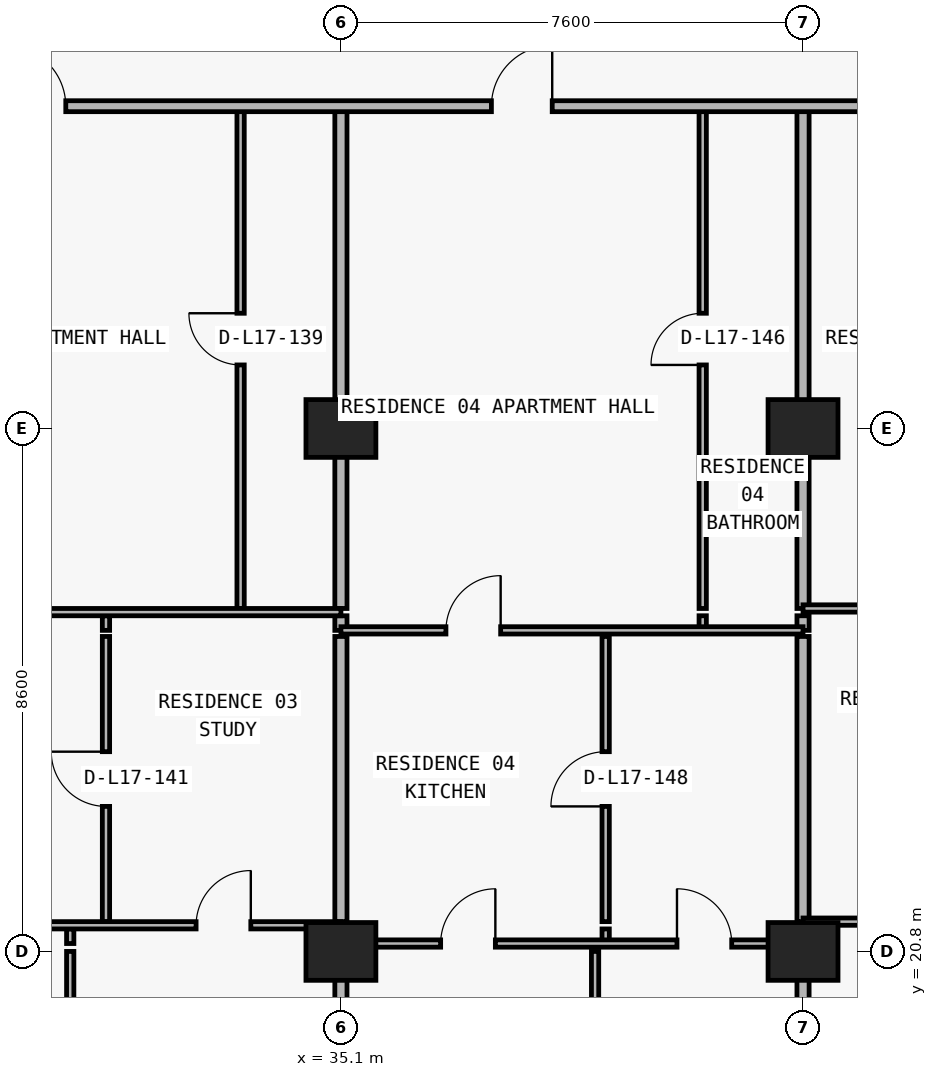
"""IFC4 building model, lengths in metres.
Left out: names, types, materials, properties, quantities, classifications, styles, units other than length and angle.
Written with IfcOpenShell. Run it as: python <this file> out.ifc"""

import sys

from ifc_helpers import new_model, si_unit, direction, frame, frame_2d, origin, origin_2d, place, context, subcontext, project, spatial, rectangle, extrude, element, fill, save


model = new_model("IFC4")
c1 = context("Model", 3, precision=1e-05, world=origin(), true_north=direction((0.0, 1.0)))
c2 = subcontext(c1, "Body", "Model", "MODEL_VIEW")
j1 = project(units=[si_unit("LENGTHUNIT", "METRE"), si_unit("PLANEANGLEUNIT", "RADIAN")], contexts=[c1])
p1 = place(None, origin())
s1 = spatial("IfcSite", under=j1, at=p1, CompositionType="ELEMENT")
p2 = place(p1, origin())
s2 = spatial("IfcBuilding", under=s1, at=p2, CompositionType="ELEMENT")
p3 = place(p2, frame((0.0, 0.0, 66.3)))
s3 = spatial("IfcBuildingStorey", under=s2, at=p3, CompositionType="ELEMENT", Elevation=66.3)
for number, where, z_axis, x_axis in (
    (1, (35.1, 20.8, 0.0), (0.0, 0.0, 1.0), (1.0, 0.0, 0.0)),
    (2, (42.7, 20.8, 0.0), (0.0, 0.0, 1.0), (1.0, 0.0, 0.0)),
    (3, (35.1, 29.4, 0.0), (0.0, 0.0, 1.0), (1.0, 0.0, 0.0)),
    (4, (42.7, 29.4, 0.0), (0.0, 0.0, 1.0), (1.0, 0.0, 0.0)),
):
    element("IfcColumn", number, at=place(p3, frame(where, z_axis=z_axis, x_axis=x_axis)), inside=s3, PredefinedType="COLUMN", context=c2, shape_type="SweptSolid", body=[
        extrude(rectangle(XDim=1.15, YDim=0.95, at=origin_2d()), origin(), (0.0, 0.0, 1.0), 3.05),
    ])
p4 = place(p3, frame((30.648, 6.24, 0.0), z_axis=(0.0, 0.0, 1.0), x_axis=(0.0, 1.0, 0.0)))
e5 = element("IfcWall", 5, at=p4, inside=s3, PredefinedType="PARTITIONING", context=c2, shape_type="SweptSolid", body=[
    extrude(rectangle(XDim=14.56, YDim=0.12, at=frame_2d((7.28, 0.0))), origin(), (0.0, 0.0, 1.0), 2.423),
])
p5 = place(p3, frame((30.648, 20.93, 0.0), z_axis=(0.0, 0.0, 1.0), x_axis=(0.0, 1.0, 0.0)))
e6 = element("IfcWall", 6, at=p5, inside=s3, PredefinedType="PARTITIONING", context=c2, shape_type="SweptSolid", body=[
    extrude(rectangle(XDim=0.24, YDim=0.12, at=frame_2d((0.12, 0.0))), origin(), (0.0, 0.0, 1.0), 2.423),
])
p6 = place(p3, frame((31.236, 21.29, 0.0), z_axis=(0.0, 0.0, 1.0), x_axis=(0.0, 1.0, 0.0)))
e7 = element("IfcWall", 7, at=p6, inside=s3, PredefinedType="PARTITIONING", context=c2, shape_type="SweptSolid", body=[
    extrude(rectangle(XDim=4.69, YDim=0.12, at=frame_2d((2.345, 0.0))), origin(), (0.0, 0.0, 1.0), 3.05),
])
p7 = place(p6, frame((1.895, 0.0, 0.0)))
e8 = element("IfcOpeningElement", 8, at=p7, cuts=e7, PredefinedType="OPENING", context=c2, shape_type="SweptSolid", body=[
    extrude(rectangle(XDim=0.9, YDim=2.15, at=frame_2d((0.45, 1.075))), frame((0.0, 0.07, 0.0), z_axis=(0.0, -1.0, 0.0), x_axis=(1.0, 0.0, 0.0)), (0.0, 0.0, 1.0), 0.14),
])
p8 = place(p3, frame((31.236, 26.08, 0.0), z_axis=(0.0, 0.0, 1.0), x_axis=(0.0, 1.0, 0.0)))
e9 = element("IfcWall", 9, at=p8, inside=s3, PredefinedType="PARTITIONING", context=c2, shape_type="SweptSolid", body=[
    extrude(rectangle(XDim=0.24, YDim=0.12, at=frame_2d((0.12, 0.0))), origin(), (0.0, 0.0, 1.0), 3.05),
])
p9 = place(p3, frame((33.45, 26.44, 0.0), z_axis=(0.0, 0.0, 1.0), x_axis=(0.0, 1.0, 0.0)))
e10 = element("IfcWall", 10, at=p9, inside=s3, PredefinedType="PARTITIONING", context=c2, shape_type="SweptSolid", body=[
    extrude(rectangle(XDim=8.26, YDim=0.12, at=frame_2d((4.13, 0.0))), origin(), (0.0, 0.0, 1.0), 3.05),
])
p10 = place(p9, frame((4.005, 0.0, 0.0)))
e11 = element("IfcOpeningElement", 11, at=p10, cuts=e10, PredefinedType="OPENING", context=c2, shape_type="SweptSolid", body=[
    extrude(rectangle(XDim=0.85, YDim=2.1, at=frame_2d((0.425, 1.05))), frame((0.0, 0.07, 0.0), z_axis=(0.0, -1.0, 0.0), x_axis=(1.0, 0.0, 0.0)), (0.0, 0.0, 1.0), 0.14),
])
p11 = place(p3, frame((35.1, 6.24, 0.0), z_axis=(0.0, 0.0, 1.0), x_axis=(0.0, 1.0, 0.0)))
e12 = element("IfcWall", 12, at=p11, inside=s3, PredefinedType="PARTITIONING", context=c2, shape_type="SweptSolid", body=[
    extrude(rectangle(XDim=14.56, YDim=0.2, at=frame_2d((7.28, 0.0))), origin(), (0.0, 0.0, 1.0), 2.11),
])
p12 = place(p3, frame((35.1, 20.93, 0.0), z_axis=(0.0, 0.0, 1.0), x_axis=(0.0, 1.0, 0.0)))
e13 = element("IfcWall", 13, at=p12, inside=s3, PredefinedType="PARTITIONING", context=c2, shape_type="SweptSolid", body=[
    extrude(rectangle(XDim=0.24, YDim=0.2, at=frame_2d((0.12, 0.0))), origin(), (0.0, 0.0, 1.0), 3.05),
])
p13 = place(p3, frame((35.1, 21.29, 0.0), z_axis=(0.0, 0.0, 1.0), x_axis=(0.0, 1.0, 0.0)))
e14 = element("IfcWall", 14, at=p13, inside=s3, PredefinedType="PARTITIONING", context=c2, shape_type="SweptSolid", body=[
    extrude(rectangle(XDim=4.69, YDim=0.2, at=frame_2d((2.345, 0.0))), origin(), (0.0, 0.0, 1.0), 2.11),
])
p14 = place(p3, frame((35.1, 26.08, 0.0), z_axis=(0.0, 0.0, 1.0), x_axis=(0.0, 1.0, 0.0)))
e15 = element("IfcWall", 15, at=p14, inside=s3, PredefinedType="PARTITIONING", context=c2, shape_type="SweptSolid", body=[
    extrude(rectangle(XDim=0.24, YDim=0.2, at=frame_2d((0.12, 0.0))), origin(), (0.0, 0.0, 1.0), 2.11),
])
p15 = place(p3, frame((35.1, 26.44, 0.0), z_axis=(0.0, 0.0, 1.0), x_axis=(0.0, 1.0, 0.0)))
e16 = element("IfcWall", 16, at=p15, inside=s3, PredefinedType="PARTITIONING", context=c2, shape_type="SweptSolid", body=[
    extrude(rectangle(XDim=8.26, YDim=0.2, at=frame_2d((4.13, 0.0))), origin(), (0.0, 0.0, 1.0), 2.11),
])
p16 = place(p3, frame((39.28, 6.24, 0.0), z_axis=(0.0, 0.0, 1.0), x_axis=(0.0, 1.0, 0.0)))
e17 = element("IfcWall", 17, at=p16, inside=s3, PredefinedType="PARTITIONING", context=c2, shape_type="SweptSolid", body=[
    extrude(rectangle(XDim=14.56, YDim=0.12, at=frame_2d((7.28, 0.0))), origin(), (0.0, 0.0, 1.0), 3.05),
])
p17 = place(p3, frame((39.454, 20.93, 0.0), z_axis=(0.0, 0.0, 1.0), x_axis=(0.0, 1.0, 0.0)))
e18 = element("IfcWall", 18, at=p17, inside=s3, PredefinedType="PARTITIONING", context=c2, shape_type="SweptSolid", body=[
    extrude(rectangle(XDim=0.24, YDim=0.12, at=frame_2d((0.12, 0.0))), origin(), (0.0, 0.0, 1.0), 3.05),
])
p18 = place(p3, frame((39.454, 21.29, 0.0), z_axis=(0.0, 0.0, 1.0), x_axis=(0.0, 1.0, 0.0)))
e19 = element("IfcWall", 19, at=p18, inside=s3, PredefinedType="PARTITIONING", context=c2, shape_type="SweptSolid", body=[
    extrude(rectangle(XDim=4.69, YDim=0.12, at=frame_2d((2.345, 0.0))), origin(), (0.0, 0.0, 1.0), 3.05),
])
p19 = place(p18, frame((1.895, 0.0, 0.0)))
e20 = element("IfcOpeningElement", 20, at=p19, cuts=e19, PredefinedType="OPENING", context=c2, shape_type="SweptSolid", body=[
    extrude(rectangle(XDim=0.9, YDim=2.15, at=frame_2d((0.45, 1.075))), frame((0.0, 0.07, 0.0), z_axis=(0.0, -1.0, 0.0), x_axis=(1.0, 0.0, 0.0)), (0.0, 0.0, 1.0), 0.14),
])
p20 = place(p3, frame((41.05, 26.08, 0.0), z_axis=(0.0, 0.0, 1.0), x_axis=(0.0, 1.0, 0.0)))
e21 = element("IfcWall", 21, at=p20, inside=s3, PredefinedType="PARTITIONING", context=c2, shape_type="SweptSolid", body=[
    extrude(rectangle(XDim=0.24, YDim=0.12, at=frame_2d((0.12, 0.0))), origin(), (0.0, 0.0, 1.0), 2.578),
])
p21 = place(p3, frame((41.05, 26.44, 0.0), z_axis=(0.0, 0.0, 1.0), x_axis=(0.0, 1.0, 0.0)))
e22 = element("IfcWall", 22, at=p21, inside=s3, PredefinedType="PARTITIONING", context=c2, shape_type="SweptSolid", body=[
    extrude(rectangle(XDim=8.26, YDim=0.12, at=frame_2d((4.13, 0.0))), origin(), (0.0, 0.0, 1.0), 2.578),
])
p22 = place(p21, frame((4.005, 0.0, 0.0)))
e23 = element("IfcOpeningElement", 23, at=p22, cuts=e22, PredefinedType="OPENING", context=c2, shape_type="SweptSolid", body=[
    extrude(rectangle(XDim=0.85, YDim=2.1, at=frame_2d((0.425, 1.05))), frame((0.0, 0.07, 0.0), z_axis=(0.0, -1.0, 0.0), x_axis=(1.0, 0.0, 0.0)), (0.0, 0.0, 1.0), 0.14),
])
p23 = place(p3, frame((42.7, 6.24, 0.0), z_axis=(0.0, 0.0, 1.0), x_axis=(0.0, 1.0, 0.0)))
e24 = element("IfcWall", 24, at=p23, inside=s3, PredefinedType="PARTITIONING", context=c2, shape_type="SweptSolid", body=[
    extrude(rectangle(XDim=14.56, YDim=0.2, at=frame_2d((7.28, 0.0))), origin(), (0.0, 0.0, 1.0), 2.11),
])
p24 = place(p3, frame((42.7, 20.93, 0.0), z_axis=(0.0, 0.0, 1.0), x_axis=(0.0, 1.0, 0.0)))
e25 = element("IfcWall", 25, at=p24, inside=s3, PredefinedType="PARTITIONING", context=c2, shape_type="SweptSolid", body=[
    extrude(rectangle(XDim=0.24, YDim=0.2, at=frame_2d((0.12, 0.0))), origin(), (0.0, 0.0, 1.0), 3.05),
])
p25 = place(p3, frame((42.7, 21.29, 0.0), z_axis=(0.0, 0.0, 1.0), x_axis=(0.0, 1.0, 0.0)))
e26 = element("IfcWall", 26, at=p25, inside=s3, PredefinedType="PARTITIONING", context=c2, shape_type="SweptSolid", body=[
    extrude(rectangle(XDim=4.69, YDim=0.2, at=frame_2d((2.345, 0.0))), origin(), (0.0, 0.0, 1.0), 2.11),
])
p26 = place(p3, frame((42.7, 26.08, 0.0), z_axis=(0.0, 0.0, 1.0), x_axis=(0.0, 1.0, 0.0)))
e27 = element("IfcWall", 27, at=p26, inside=s3, PredefinedType="PARTITIONING", context=c2, shape_type="SweptSolid", body=[
    extrude(rectangle(XDim=0.24, YDim=0.2, at=frame_2d((0.12, 0.0))), origin(), (0.0, 0.0, 1.0), 2.11),
])
p27 = place(p3, frame((42.7, 26.44, 0.0), z_axis=(0.0, 0.0, 1.0), x_axis=(0.0, 1.0, 0.0)))
e28 = element("IfcWall", 28, at=p27, inside=s3, PredefinedType="PARTITIONING", context=c2, shape_type="SweptSolid", body=[
    extrude(rectangle(XDim=8.26, YDim=0.2, at=frame_2d((4.13, 0.0))), origin(), (0.0, 0.0, 1.0), 2.11),
])
p28 = place(p3, frame((35.1, 20.93, 0.0), z_axis=(0.0, 0.0, 1.0), x_axis=(1.0, 0.0, 0.0)))
e29 = element("IfcWall", 29, at=p28, inside=s3, PredefinedType="PARTITIONING", context=c2, shape_type="SweptSolid", body=[
    extrude(rectangle(XDim=7.6, YDim=0.12, at=frame_2d((3.8, 0.0))), origin(), (0.0, 0.0, 1.0), 2.11),
])
p29 = place(p28, frame((1.64, 0.0, 0.0)))
e30 = element("IfcOpeningElement", 30, at=p29, cuts=e29, PredefinedType="OPENING", context=c2, shape_type="SweptSolid", body=[
    extrude(rectangle(XDim=0.9, YDim=2.06, at=frame_2d((0.45, 1.03))), frame((0.0, 0.07, 0.0), z_axis=(0.0, -1.0, 0.0), x_axis=(1.0, 0.0, 0.0)), (0.0, 0.0, 1.0), 0.14),
])
p30 = place(p28, frame((5.527, 0.0, 0.0)))
e31 = element("IfcOpeningElement", 31, at=p30, cuts=e29, PredefinedType="OPENING", context=c2, shape_type="SweptSolid", body=[
    extrude(rectangle(XDim=0.9, YDim=2.06, at=frame_2d((0.45, 1.03))), frame((0.0, 0.07, 0.0), z_axis=(0.0, -1.0, 0.0), x_axis=(1.0, 0.0, 0.0)), (0.0, 0.0, 1.0), 0.14),
])
p31 = place(p3, frame((26.97, 21.23, 0.0), z_axis=(0.0, 0.0, 1.0), x_axis=(1.0, 0.0, 0.0)))
e32 = element("IfcWall", 32, at=p31, inside=s3, PredefinedType="PARTITIONING", context=c2, shape_type="SweptSolid", body=[
    extrude(rectangle(XDim=8.13, YDim=0.12, at=frame_2d((4.065, 0.0))), origin(), (0.0, 0.0, 1.0), 3.05),
])
p32 = place(p31, frame((1.389, 0.0, 0.0)))
e33 = element("IfcOpeningElement", 33, at=p32, cuts=e32, PredefinedType="OPENING", context=c2, shape_type="SweptSolid", body=[
    extrude(rectangle(XDim=0.9, YDim=2.15, at=frame_2d((0.45, 1.075))), frame((0.0, 0.07, 0.0), z_axis=(0.0, -1.0, 0.0), x_axis=(1.0, 0.0, 0.0)), (0.0, 0.0, 1.0), 0.14),
])
p33 = place(p31, frame((5.748, 0.0, 0.0)))
e34 = element("IfcOpeningElement", 34, at=p33, cuts=e32, PredefinedType="OPENING", context=c2, shape_type="SweptSolid", body=[
    extrude(rectangle(XDim=0.9, YDim=2.15, at=frame_2d((0.45, 1.075))), frame((0.0, 0.07, 0.0), z_axis=(0.0, -1.0, 0.0), x_axis=(1.0, 0.0, 0.0)), (0.0, 0.0, 1.0), 0.14),
])
p34 = place(p3, frame((42.7, 21.29, 0.0), z_axis=(0.0, 0.0, 1.0), x_axis=(1.0, 0.0, 0.0)))
e35 = element("IfcWall", 35, at=p34, inside=s3, PredefinedType="PARTITIONING", context=c2, shape_type="SweptSolid", body=[
    extrude(rectangle(XDim=8.13, YDim=0.12, at=frame_2d((4.065, 0.0))), origin(), (0.0, 0.0, 1.0), 3.05),
])
p35 = place(p34, frame((1.524, 0.0, 0.0)))
e36 = element("IfcOpeningElement", 36, at=p35, cuts=e35, PredefinedType="OPENING", context=c2, shape_type="SweptSolid", body=[
    extrude(rectangle(XDim=0.9, YDim=2.15, at=frame_2d((0.45, 1.075))), frame((0.0, 0.07, 0.0), z_axis=(0.0, -1.0, 0.0), x_axis=(1.0, 0.0, 0.0)), (0.0, 0.0, 1.0), 0.14),
])
p36 = place(p34, frame((5.758, 0.0, 0.0)))
e37 = element("IfcOpeningElement", 37, at=p36, cuts=e35, PredefinedType="OPENING", context=c2, shape_type="SweptSolid", body=[
    extrude(rectangle(XDim=0.9, YDim=2.15, at=frame_2d((0.45, 1.075))), frame((0.0, 0.07, 0.0), z_axis=(0.0, -1.0, 0.0), x_axis=(1.0, 0.0, 0.0)), (0.0, 0.0, 1.0), 0.14),
])
p37 = place(p3, frame((35.1, 26.08, 0.0), z_axis=(0.0, 0.0, 1.0), x_axis=(1.0, 0.0, 0.0)))
e38 = element("IfcWall", 38, at=p37, inside=s3, PredefinedType="PARTITIONING", context=c2, shape_type="SweptSolid", body=[
    extrude(rectangle(XDim=7.6, YDim=0.12, at=frame_2d((3.8, 0.0))), origin(), (0.0, 0.0, 1.0), 3.05),
])
p38 = place(p37, frame((1.727, 0.0, 0.0)))
e39 = element("IfcOpeningElement", 39, at=p38, cuts=e38, PredefinedType="OPENING", context=c2, shape_type="SweptSolid", body=[
    extrude(rectangle(XDim=0.9, YDim=2.15, at=frame_2d((0.45, 1.075))), frame((0.0, 0.07, 0.0), z_axis=(0.0, -1.0, 0.0), x_axis=(1.0, 0.0, 0.0)), (0.0, 0.0, 1.0), 0.14),
])
p39 = place(p3, frame((26.97, 26.38, 0.0), z_axis=(0.0, 0.0, 1.0), x_axis=(1.0, 0.0, 0.0)))
e40 = element("IfcWall", 40, at=p39, inside=s3, PredefinedType="PARTITIONING", context=c2, shape_type="SweptSolid", body=[
    extrude(rectangle(XDim=8.13, YDim=0.12, at=frame_2d((4.065, 0.0))), origin(), (0.0, 0.0, 1.0), 3.05),
])
p40 = place(p39, frame((1.683, 0.0, 0.0)))
e41 = element("IfcOpeningElement", 41, at=p40, cuts=e40, PredefinedType="OPENING", context=c2, shape_type="SweptSolid", body=[
    extrude(rectangle(XDim=0.9, YDim=2.15, at=frame_2d((0.45, 1.075))), frame((0.0, 0.07, 0.0), z_axis=(0.0, -1.0, 0.0), x_axis=(1.0, 0.0, 0.0)), (0.0, 0.0, 1.0), 0.14),
])
p41 = place(p3, frame((42.7, 26.44, 0.0), z_axis=(0.0, 0.0, 1.0), x_axis=(1.0, 0.0, 0.0)))
e42 = element("IfcWall", 42, at=p41, inside=s3, PredefinedType="PARTITIONING", context=c2, shape_type="SweptSolid", body=[
    extrude(rectangle(XDim=8.13, YDim=0.12, at=frame_2d((4.065, 0.0))), origin(), (0.0, 0.0, 1.0), 3.05),
])
p42 = place(p41, frame((1.693, 0.0, 0.0)))
e43 = element("IfcOpeningElement", 43, at=p42, cuts=e42, PredefinedType="OPENING", context=c2, shape_type="SweptSolid", body=[
    extrude(rectangle(XDim=0.9, YDim=2.15, at=frame_2d((0.45, 1.075))), frame((0.0, 0.07, 0.0), z_axis=(0.0, -1.0, 0.0), x_axis=(1.0, 0.0, 0.0)), (0.0, 0.0, 1.0), 0.14),
])
p43 = place(p3, frame((26.7, 34.7, 0.0), z_axis=(0.0, 0.0, 1.0), x_axis=(1.0, 0.0, 0.0)))
e44 = element("IfcWall", 44, at=p43, inside=s3, PredefinedType="PARTITIONING", context=c2, shape_type="SweptSolid", body=[
    extrude(rectangle(XDim=46.0, YDim=0.18, at=frame_2d((23.0, 0.0))), origin(), (0.0, 0.0, 1.0), 3.05),
])
p44 = place(p43, frame((2.875, 0.0, 0.0)))
e45 = element("IfcOpeningElement", 45, at=p44, cuts=e44, PredefinedType="OPENING", context=c2, shape_type="SweptSolid", body=[
    extrude(rectangle(XDim=1.0, YDim=2.2, at=frame_2d((0.5, 1.1))), frame((0.0, 0.1, 0.0), z_axis=(0.0, -1.0, 0.0), x_axis=(1.0, 0.0, 0.0)), (0.0, 0.0, 1.0), 0.2),
])
p45 = place(p43, frame((10.875, 0.0, 0.0)))
e46 = element("IfcOpeningElement", 46, at=p45, cuts=e44, PredefinedType="OPENING", context=c2, shape_type="SweptSolid", body=[
    extrude(rectangle(XDim=1.0, YDim=2.2, at=frame_2d((0.5, 1.1))), frame((0.0, 0.1, 0.0), z_axis=(0.0, -1.0, 0.0), x_axis=(1.0, 0.0, 0.0)), (0.0, 0.0, 1.0), 0.2),
])
p46 = place(p43, frame((18.875, 0.0, 0.0)))
e47 = element("IfcOpeningElement", 47, at=p46, cuts=e44, PredefinedType="OPENING", context=c2, shape_type="SweptSolid", body=[
    extrude(rectangle(XDim=1.0, YDim=2.2, at=frame_2d((0.5, 1.1))), frame((0.0, 0.1, 0.0), z_axis=(0.0, -1.0, 0.0), x_axis=(1.0, 0.0, 0.0)), (0.0, 0.0, 1.0), 0.2),
])
p47 = place(p43, frame((27.275, 0.0, 0.0)))
e48 = element("IfcOpeningElement", 48, at=p47, cuts=e44, PredefinedType="OPENING", context=c2, shape_type="SweptSolid", body=[
    extrude(rectangle(XDim=1.0, YDim=2.2, at=frame_2d((0.5, 1.1))), frame((0.0, 0.1, 0.0), z_axis=(0.0, -1.0, 0.0), x_axis=(1.0, 0.0, 0.0)), (0.0, 0.0, 1.0), 0.2),
])
p48 = place(p43, frame((35.675, 0.0, 0.0)))
e49 = element("IfcOpeningElement", 49, at=p48, cuts=e44, PredefinedType="OPENING", context=c2, shape_type="SweptSolid", body=[
    extrude(rectangle(XDim=1.0, YDim=2.2, at=frame_2d((0.5, 1.1))), frame((0.0, 0.1, 0.0), z_axis=(0.0, -1.0, 0.0), x_axis=(1.0, 0.0, 0.0)), (0.0, 0.0, 1.0), 0.2),
])
p49 = place(p44, origin())
e50 = element("IfcDoor", 50, at=p49, inside=s3, OperationType="SINGLE_SWING_LEFT", PredefinedType="DOOR", context=c2, shape_type="SweptSolid", body=[
    extrude(rectangle(XDim=1.0, YDim=2.2, at=frame_2d((0.5, 1.1))), frame((0.0, 0.025, 0.0), z_axis=(0.0, -1.0, 0.0), x_axis=(1.0, 0.0, 0.0)), (0.0, 0.0, 1.0), 0.05),
])
fill(e45, e50)
p50 = place(p10, origin())
e51 = element("IfcDoor", 51, at=p50, inside=s3, OperationType="SINGLE_SWING_RIGHT", PredefinedType="DOOR", context=c2, shape_type="SweptSolid", body=[
    extrude(rectangle(XDim=0.85, YDim=2.1, at=frame_2d((0.425, 1.05))), frame((0.0, 0.025, 0.0), z_axis=(0.0, -1.0, 0.0), x_axis=(1.0, 0.0, 0.0)), (0.0, 0.0, 1.0), 0.05),
])
fill(e11, e51)
p51 = place(p7, origin())
e52 = element("IfcDoor", 52, at=p51, inside=s3, OperationType="SINGLE_SWING_RIGHT", PredefinedType="DOOR", context=c2, shape_type="SweptSolid", body=[
    extrude(rectangle(XDim=0.9, YDim=2.15, at=frame_2d((0.45, 1.075))), frame((0.0, 0.025, 0.0), z_axis=(0.0, -1.0, 0.0), x_axis=(1.0, 0.0, 0.0)), (0.0, 0.0, 1.0), 0.05),
])
fill(e8, e52)
p52 = place(p33, origin())
e53 = element("IfcDoor", 53, at=p52, inside=s3, OperationType="SINGLE_SWING_RIGHT", PredefinedType="DOOR", context=c2, shape_type="SweptSolid", body=[
    extrude(rectangle(XDim=0.9, YDim=2.15, at=frame_2d((0.45, 1.075))), frame((0.0, 0.025, 0.0), z_axis=(0.0, -1.0, 0.0), x_axis=(1.0, 0.0, 0.0)), (0.0, 0.0, 1.0), 0.05),
])
fill(e34, e53)
p53 = place(p45, origin())
e54 = element("IfcDoor", 54, at=p53, inside=s3, OperationType="SINGLE_SWING_RIGHT", PredefinedType="DOOR", context=c2, shape_type="SweptSolid", body=[
    extrude(rectangle(XDim=1.0, YDim=2.2, at=frame_2d((0.5, 1.1))), frame((0.0, 0.025, 0.0), z_axis=(0.0, -1.0, 0.0), x_axis=(1.0, 0.0, 0.0)), (0.0, 0.0, 1.0), 0.05),
])
fill(e46, e54)
p54 = place(p22, origin())
e55 = element("IfcDoor", 55, at=p54, inside=s3, OperationType="SINGLE_SWING_LEFT", PredefinedType="DOOR", context=c2, shape_type="SweptSolid", body=[
    extrude(rectangle(XDim=0.85, YDim=2.1, at=frame_2d((0.425, 1.05))), frame((0.0, 0.025, 0.0), z_axis=(0.0, -1.0, 0.0), x_axis=(1.0, 0.0, 0.0)), (0.0, 0.0, 1.0), 0.05),
])
fill(e23, e55)
p55 = place(p38, origin())
e56 = element("IfcDoor", 56, at=p55, inside=s3, OperationType="SINGLE_SWING_RIGHT", PredefinedType="DOOR", context=c2, shape_type="SweptSolid", body=[
    extrude(rectangle(XDim=0.9, YDim=2.15, at=frame_2d((0.45, 1.075))), frame((0.0, 0.025, 0.0), z_axis=(0.0, -1.0, 0.0), x_axis=(1.0, 0.0, 0.0)), (0.0, 0.0, 1.0), 0.05),
])
fill(e39, e56)
p56 = place(p19, origin())
e57 = element("IfcDoor", 57, at=p56, inside=s3, OperationType="SINGLE_SWING_LEFT", PredefinedType="DOOR", context=c2, shape_type="SweptSolid", body=[
    extrude(rectangle(XDim=0.9, YDim=2.15, at=frame_2d((0.45, 1.075))), frame((0.0, 0.025, 0.0), z_axis=(0.0, -1.0, 0.0), x_axis=(1.0, 0.0, 0.0)), (0.0, 0.0, 1.0), 0.05),
])
fill(e20, e57)
p57 = place(p29, origin())
e58 = element("IfcDoor", 58, at=p57, inside=s3, OperationType="SINGLE_SWING_RIGHT", PredefinedType="DOOR", context=c2, shape_type="SweptSolid", body=[
    extrude(rectangle(XDim=0.9, YDim=2.06, at=frame_2d((0.45, 1.03))), frame((0.0, 0.025, 0.0), z_axis=(0.0, -1.0, 0.0), x_axis=(1.0, 0.0, 0.0)), (0.0, 0.0, 1.0), 0.05),
])
fill(e30, e58)
p58 = place(p30, origin())
e59 = element("IfcDoor", 59, at=p58, inside=s3, OperationType="SINGLE_SWING_LEFT", PredefinedType="DOOR", context=c2, shape_type="SweptSolid", body=[
    extrude(rectangle(XDim=0.9, YDim=2.06, at=frame_2d((0.45, 1.03))), frame((0.0, 0.025, 0.0), z_axis=(0.0, -1.0, 0.0), x_axis=(1.0, 0.0, 0.0)), (0.0, 0.0, 1.0), 0.05),
])
fill(e31, e59)
save(model, sys.argv[1])
